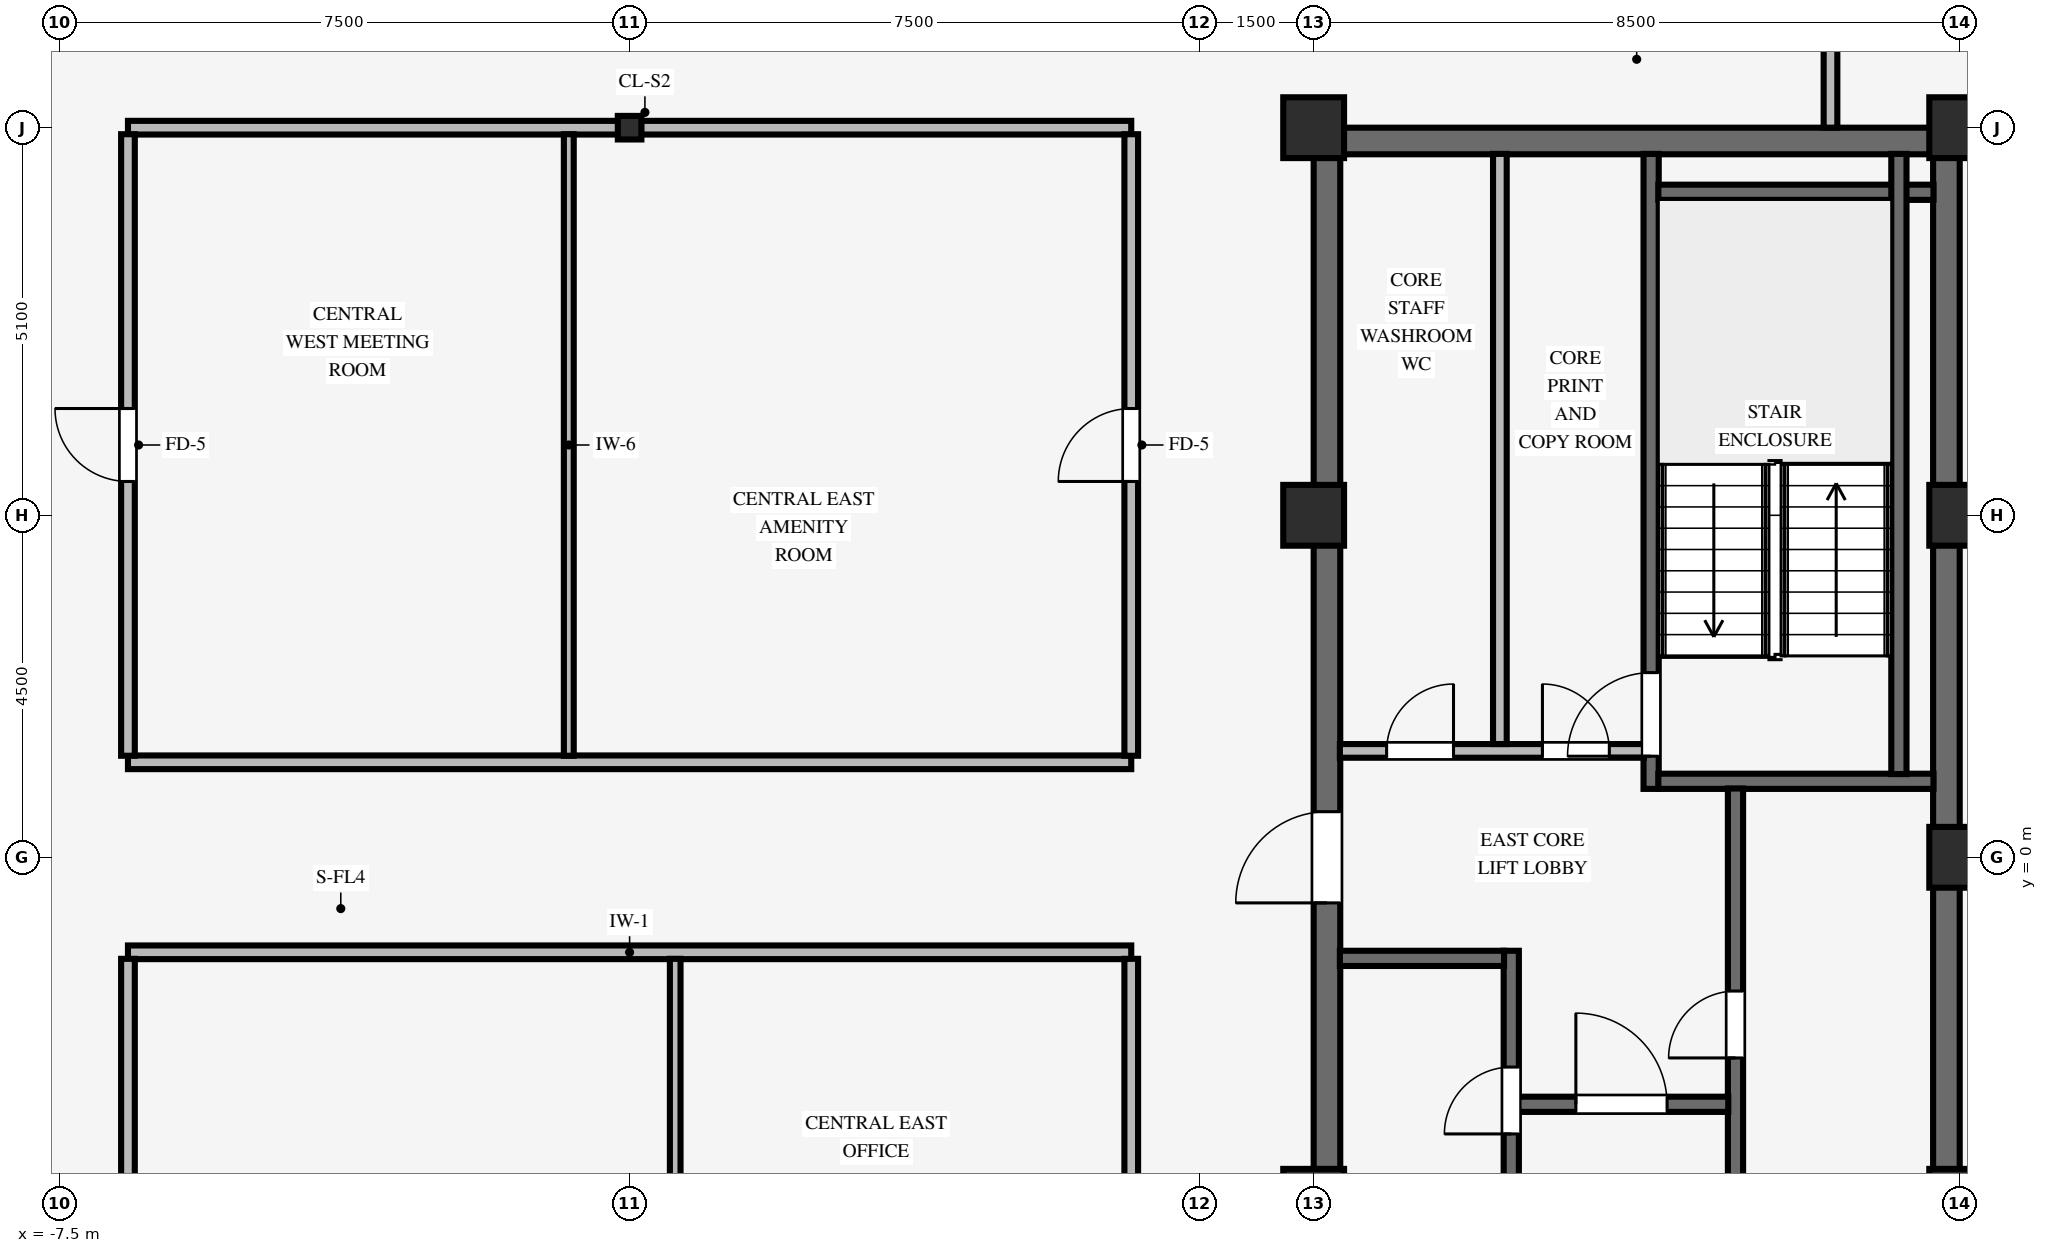
"""IFC4 building model, lengths in metres.
Left out: names, types, materials, properties, quantities, classifications, styles, units other than length and angle.
Written with IfcOpenShell. Run it as: python <this file> out.ifc"""

import sys

from ifc_helpers import new_model, si_unit, direction, frame, frame_2d, origin, origin_2d, place, context, subcontext, project, spatial, rectangle, i_section, extrude, source, transform, mapped, element, fill, save


model = new_model("IFC4")
c1 = context("Model", 3, precision=1e-05, world=origin(), true_north=direction((0.0, 1.0)))
c2 = subcontext(c1, "Body", "Model", "MODEL_VIEW")
j1 = project(units=[si_unit("LENGTHUNIT", "METRE"), si_unit("PLANEANGLEUNIT", "RADIAN")], contexts=[c1])
p1 = place(None, origin())
s1 = spatial("IfcSite", under=j1, at=p1, CompositionType="ELEMENT")
p2 = place(p1, origin())
s2 = spatial("IfcBuilding", under=s1, at=p2, CompositionType="ELEMENT")
p3 = place(p2, frame((0.0, 0.0, 231.05)))
s3 = spatial("IfcBuildingStorey", under=s2, at=p3, CompositionType="ELEMENT", Elevation=231.05)
p4 = place(p3, frame((9.0, 9.425, 0.0), z_axis=(0.0, 0.0, 1.0), x_axis=(1.0, 0.0, 0.0)))
e1 = element("IfcWall", 1, at=p4, inside=s3, PredefinedType="SHEAR", context=c2, shape_type="SweptSolid", body=[
    extrude(rectangle(XDim=8.5, YDim=0.35, at=frame_2d((4.25, 0.0))), origin(), (0.0, 0.0, 1.0), 3.37),
])
p5 = place(p3, frame((9.175, -9.255, 0.0), z_axis=(0.0, 0.0, 1.0), x_axis=(0.0, 1.0, 0.0)))
e2 = element("IfcWall", 2, at=p5, inside=s3, PredefinedType="SHEAR", context=c2, shape_type="SweptSolid", body=[
    extrude(rectangle(XDim=18.51, YDim=0.35, at=frame_2d((9.255, 0.0))), origin(), (0.0, 0.0, 1.0), 3.37),
])
p6 = place(p5, frame((8.655, 0.0, 0.0)))
e3 = element("IfcOpeningElement", 3, at=p6, cuts=e2, PredefinedType="OPENING", context=c2, shape_type="SweptSolid", body=[
    extrude(rectangle(XDim=1.2, YDim=2.15, at=frame_2d((0.6, 1.075))), frame((0.0, 0.185, 0.0), z_axis=(0.0, -1.0, 0.0), x_axis=(1.0, 0.0, 0.0)), (0.0, 0.0, 1.0), 0.37),
])
p7 = place(p3, frame((17.325, -9.255, 0.0), z_axis=(0.0, 0.0, 1.0), x_axis=(0.0, 1.0, 0.0)))
e4 = element("IfcWall", 4, at=p7, inside=s3, PredefinedType="SHEAR", context=c2, shape_type="SweptSolid", body=[
    extrude(rectangle(XDim=18.51, YDim=0.35, at=frame_2d((9.255, 0.0))), origin(), (0.0, 0.0, 1.0), 3.37),
])
for number, where, z_axis, x_axis in (
    (5, (9.0, -4.5, 0.0), (0.0, 0.0, 1.0), (1.0, 0.0, 0.0)),
    (6, (9.0, 4.5, 0.0), (0.0, 0.0, 1.0), (1.0, 0.0, 0.0)),
    (7, (9.0, 9.6, 0.0), (0.0, 0.0, 1.0), (1.0, 0.0, 0.0)),
    (8, (17.5, -4.5, 0.0), (0.0, 0.0, 1.0), (1.0, 0.0, 0.0)),
    (9, (17.5, 4.5, 0.0), (0.0, 0.0, 1.0), (1.0, 0.0, 0.0)),
    (10, (17.5, 9.6, 0.0), (0.0, 0.0, 1.0), (1.0, 0.0, 0.0)),
    (11, (17.5, 0.0, 0.0), (0.0, 0.0, 1.0), (1.0, 0.0, 0.0)),
):
    element("IfcColumn", number, at=place(p3, frame(where, z_axis=z_axis, x_axis=x_axis)), inside=s3, PredefinedType="COLUMN", context=c2, shape_type="SweptSolid", body=[
        extrude(rectangle(XDim=0.8, YDim=0.8, at=origin_2d()), origin(), (0.0, 0.0, 1.0), 3.37),
    ])
p8 = place(p3, frame((0.0, 9.6, 0.0), z_axis=(0.0, 0.0, 1.0), x_axis=(1.0, 0.0, 0.0)))
e12 = element("IfcColumn", 12, at=p8, inside=s3, PredefinedType="COLUMN", context=c2, shape_type="SweptSolid", body=[
    extrude(i_section(OverallWidth=0.31, OverallDepth=0.31, WebThickness=0.015, FlangeThickness=0.015, FilletRadius=0.015, at=origin_2d()), origin(), (0.0, 0.0, 1.0), 3.37),
])
p9 = place(p3, frame((13.44, 0.9, 0.0), z_axis=(0.0, 0.0, 1.0), x_axis=(0.0, 1.0, 0.0)))
e13 = element("IfcWall", 13, at=p9, inside=s3, PredefinedType="SHEAR", context=c2, shape_type="SweptSolid", body=[
    extrude(rectangle(XDim=8.355, YDim=0.2, at=frame_2d((4.177, 0.0))), origin(), (0.0, 0.0, 1.0), 3.37),
])
p10 = place(p9, frame((0.43, 0.0, 0.0)))
e14 = element("IfcOpeningElement", 14, at=p10, cuts=e13, PredefinedType="OPENING", context=c2, shape_type="SweptSolid", body=[
    extrude(rectangle(XDim=1.1, YDim=2.15, at=frame_2d((0.55, 1.075))), frame((0.0, 0.11, 0.0), z_axis=(0.0, -1.0, 0.0), x_axis=(1.0, 0.0, 0.0)), (0.0, 0.0, 1.0), 0.22),
])
for number, where, z_axis, x_axis in (
    (15, (13.535, 1.0, 0.0), (0.0, 0.0, 1.0), (1.0, 0.0, 0.0)),
    (16, (13.535, 8.75, 0.0), (0.0, 0.0, 1.0), (1.0, 0.0, 0.0)),
):
    element("IfcWall", number, at=place(p3, frame(where, z_axis=z_axis, x_axis=x_axis)), inside=s3, PredefinedType="SHEAR", context=c2, shape_type="SweptSolid", body=[
        extrude(rectangle(XDim=3.62, YDim=0.2, at=frame_2d((1.81, 0.0))), origin(), (0.0, 0.0, 1.0), 3.37),
    ])
p11 = place(p3, frame((16.7, 1.095, 0.0), z_axis=(0.0, 0.0, 1.0), x_axis=(0.0, 1.0, 0.0)))
e17 = element("IfcWall", 17, at=p11, inside=s3, PredefinedType="SHEAR", context=c2, shape_type="SweptSolid", body=[
    extrude(rectangle(XDim=8.16, YDim=0.2, at=frame_2d((4.08, 0.0))), origin(), (0.0, 0.0, 1.0), 3.37),
])
p12 = place(p3, frame((14.55, -9.255, 0.0), z_axis=(0.0, 0.0, 1.0), x_axis=(0.0, 1.0, 0.0)))
e18 = element("IfcWall", 18, at=p12, inside=s3, PredefinedType="SHEAR", context=c2, shape_type="SweptSolid", body=[
    extrude(rectangle(XDim=10.16, YDim=0.2, at=frame_2d((5.08, 0.0))), origin(), (0.0, 0.0, 1.0), 3.37),
])
p13 = place(p12, frame((6.615, 0.0, 0.0)))
e19 = element("IfcOpeningElement", 19, at=p13, cuts=e18, PredefinedType="OPENING", context=c2, shape_type="SweptSolid", body=[
    extrude(rectangle(XDim=0.88, YDim=2.1, at=frame_2d((0.44, 1.05))), frame((0.0, 0.11, 0.0), z_axis=(0.0, -1.0, 0.0), x_axis=(1.0, 0.0, 0.0)), (0.0, 0.0, 1.0), 0.22),
])
p14 = place(p12, frame((0.98, 0.0, 0.0)))
e20 = element("IfcOpeningElement", 20, at=p14, cuts=e18, PredefinedType="OPENING", context=c2, shape_type="SweptSolid", body=[
    extrude(rectangle(XDim=1.15, YDim=2.15, at=frame_2d((0.575, 1.075))), frame((0.0, 0.11, 0.0), z_axis=(0.0, -1.0, 0.0), x_axis=(1.0, 0.0, 0.0)), (0.0, 0.0, 1.0), 0.22),
])
p15 = place(p3, frame((11.6, -9.255, 0.0), z_axis=(0.0, 0.0, 1.0), x_axis=(0.0, 1.0, 0.0)))
e21 = element("IfcWall", 21, at=p15, inside=s3, PredefinedType="SHEAR", context=c2, shape_type="SweptSolid", body=[
    extrude(rectangle(XDim=8.025, YDim=0.2, at=frame_2d((4.012, 0.0))), origin(), (0.0, 0.0, 1.0), 3.37),
])
p16 = place(p15, frame((5.615, 0.0, 0.0)))
e22 = element("IfcOpeningElement", 22, at=p16, cuts=e21, PredefinedType="OPENING", context=c2, shape_type="SweptSolid", body=[
    extrude(rectangle(XDim=0.88, YDim=2.1, at=frame_2d((0.44, 1.05))), frame((0.0, 0.11, 0.0), z_axis=(0.0, -1.0, 0.0), x_axis=(1.0, 0.0, 0.0)), (0.0, 0.0, 1.0), 0.22),
])
p17 = place(p3, frame((11.695, -3.25, 0.0), z_axis=(0.0, 0.0, 1.0), x_axis=(1.0, 0.0, 0.0)))
e23 = element("IfcWall", 23, at=p17, inside=s3, PredefinedType="SHEAR", context=c2, shape_type="SweptSolid", body=[
    extrude(rectangle(XDim=2.76, YDim=0.2, at=frame_2d((1.38, 0.0))), origin(), (0.0, 0.0, 1.0), 3.37),
])
p18 = place(p17, frame((0.755, 0.0, 0.0)))
e24 = element("IfcOpeningElement", 24, at=p18, cuts=e23, PredefinedType="OPENING", context=c2, shape_type="SweptSolid", body=[
    extrude(rectangle(XDim=1.2, YDim=2.15, at=frame_2d((0.6, 1.075))), frame((0.0, 0.11, 0.0), z_axis=(0.0, -1.0, 0.0), x_axis=(1.0, 0.0, 0.0)), (0.0, 0.0, 1.0), 0.22),
])
p19 = place(p3, frame((9.345, -1.33, 0.0), z_axis=(0.0, 0.0, 1.0), x_axis=(1.0, 0.0, 0.0)))
e25 = element("IfcWall", 25, at=p19, inside=s3, PredefinedType="SHEAR", context=c2, shape_type="SweptSolid", body=[
    extrude(rectangle(XDim=2.16, YDim=0.2, at=frame_2d((1.08, 0.0))), origin(), (0.0, 0.0, 1.0), 3.37),
])
p20 = place(p3, frame((9.345, 1.4, 0.0), z_axis=(0.0, 0.0, 1.0), x_axis=(1.0, 0.0, 0.0)))
e26 = element("IfcWall", 26, at=p20, inside=s3, PredefinedType="PARTITIONING", context=c2, shape_type="SweptSolid", body=[
    extrude(rectangle(XDim=4.0, YDim=0.18, at=frame_2d((2.0, 0.0))), origin(), (0.0, 0.0, 1.0), 3.36),
])
p21 = place(p20, frame((0.615, 0.0, 0.0)))
e27 = element("IfcOpeningElement", 27, at=p21, cuts=e26, PredefinedType="OPENING", context=c2, shape_type="SweptSolid", body=[
    extrude(rectangle(XDim=0.88, YDim=2.1, at=frame_2d((0.44, 1.05))), frame((0.0, 0.1, 0.0), z_axis=(0.0, -1.0, 0.0), x_axis=(1.0, 0.0, 0.0)), (0.0, 0.0, 1.0), 0.2),
])
p22 = place(p20, frame((2.665, 0.0, 0.0)))
e28 = element("IfcOpeningElement", 28, at=p22, cuts=e26, PredefinedType="OPENING", context=c2, shape_type="SweptSolid", body=[
    extrude(rectangle(XDim=0.88, YDim=2.1, at=frame_2d((0.44, 1.05))), frame((0.0, 0.1, 0.0), z_axis=(0.0, -1.0, 0.0), x_axis=(1.0, 0.0, 0.0)), (0.0, 0.0, 1.0), 0.2),
])
p23 = place(p3, frame((11.45, 1.49, 0.0), z_axis=(0.0, 0.0, 1.0), x_axis=(0.0, 1.0, 0.0)))
e29 = element("IfcWall", 29, at=p23, inside=s3, PredefinedType="PARTITIONING", context=c2, shape_type="SweptSolid", body=[
    extrude(rectangle(XDim=7.765, YDim=0.18, at=frame_2d((3.882, 0.0))), origin(), (0.0, 0.0, 1.0), 3.36),
])
for number, where, z_axis, x_axis in (
    (30, (-6.6, -1.25, 0.0), (0.0, 0.0, 1.0), (1.0, 0.0, 0.0)),
    (31, (-6.6, 1.25, 0.0), (0.0, 0.0, 1.0), (1.0, 0.0, 0.0)),
):
    element("IfcWall", number, at=place(p3, frame(where, z_axis=z_axis, x_axis=x_axis)), inside=s3, PredefinedType="PARTITIONING", context=c2, shape_type="SweptSolid", body=[
        extrude(rectangle(XDim=13.2, YDim=0.18, at=frame_2d((6.6, 0.0))), origin(), (0.0, 0.0, 1.0), 3.36),
    ])
for number, where, z_axis, x_axis in (
    (32, (-6.6, 9.6, 0.0), (0.0, 0.0, 1.0), (1.0, 0.0, 0.0)),
    (33, (0.151, 9.6, 0.0), (0.0, 0.0, 1.0), (1.0, 0.0, 0.0)),
):
    element("IfcWall", number, at=place(p3, frame(where, z_axis=z_axis, x_axis=x_axis)), inside=s3, PredefinedType="PARTITIONING", context=c2, shape_type="SweptSolid", body=[
        extrude(rectangle(XDim=6.449, YDim=0.18, at=frame_2d((3.225, 0.0))), origin(), (0.0, 0.0, 1.0), 2.405),
    ])
p24 = place(p3, frame((-6.6, -19.1, 0.0), z_axis=(0.0, 0.0, 1.0), x_axis=(0.0, 1.0, 0.0)))
e34 = element("IfcWall", 34, at=p24, inside=s3, PredefinedType="PARTITIONING", context=c2, shape_type="SweptSolid", body=[
    extrude(rectangle(XDim=17.764, YDim=0.18, at=frame_2d((8.882, 0.0))), origin(), (0.0, 0.0, 1.0), 3.36),
])
p25 = place(p24, frame((13.152, 0.0, 0.0)))
e35 = element("IfcOpeningElement", 35, at=p25, cuts=e34, PredefinedType="OPENING", context=c2, shape_type="SweptSolid", body=[
    extrude(rectangle(XDim=0.96, YDim=2.1, at=frame_2d((0.48, 1.05))), frame((0.0, 0.1, 0.0), z_axis=(0.0, -1.0, 0.0), x_axis=(1.0, 0.0, 0.0)), (0.0, 0.0, 1.0), 0.2),
])
p26 = place(p24, frame((1.37, 0.0, 0.0)))
e36 = element("IfcOpeningElement", 36, at=p26, cuts=e34, PredefinedType="OPENING", context=c2, shape_type="SweptSolid", body=[
    extrude(rectangle(XDim=0.96, YDim=2.1, at=frame_2d((0.48, 1.05))), frame((0.0, 0.1, 0.0), z_axis=(0.0, -1.0, 0.0), x_axis=(1.0, 0.0, 0.0)), (0.0, 0.0, 1.0), 0.2),
])
p27 = place(p3, frame((-6.6, 1.336, 0.0), z_axis=(0.0, 0.0, 1.0), x_axis=(0.0, 1.0, 0.0)))
e37 = element("IfcWall", 37, at=p27, inside=s3, PredefinedType="PARTITIONING", context=c2, shape_type="SweptSolid", body=[
    extrude(rectangle(XDim=8.178, YDim=0.18, at=frame_2d((4.089, 0.0))), origin(), (0.0, 0.0, 1.0), 3.36),
])
p28 = place(p27, frame((3.609, 0.0, 0.0)))
e38 = element("IfcOpeningElement", 38, at=p28, cuts=e37, PredefinedType="OPENING", context=c2, shape_type="SweptSolid", body=[
    extrude(rectangle(XDim=0.96, YDim=2.1, at=frame_2d((0.48, 1.05))), frame((0.0, 0.1, 0.0), z_axis=(0.0, -1.0, 0.0), x_axis=(1.0, 0.0, 0.0)), (0.0, 0.0, 1.0), 0.2),
])
p29 = place(p3, frame((-0.8, 1.336, 0.0), z_axis=(0.0, 0.0, 1.0), x_axis=(0.0, 1.0, 0.0)))
e39 = element("IfcWall", 39, at=p29, inside=s3, PredefinedType="PARTITIONING", context=c2, shape_type="SweptSolid", body=[
    extrude(rectangle(XDim=8.178, YDim=0.13, at=frame_2d((4.089, 0.0))), origin(), (0.0, 0.0, 1.0), 3.36),
])
p30 = place(p3, frame((0.6, -9.524, 0.0), z_axis=(0.0, 0.0, 1.0), x_axis=(0.0, 1.0, 0.0)))
e40 = element("IfcWall", 40, at=p30, inside=s3, PredefinedType="PARTITIONING", context=c2, shape_type="SweptSolid", body=[
    extrude(rectangle(XDim=8.188, YDim=0.14, at=frame_2d((4.094, 0.0))), origin(), (0.0, 0.0, 1.0), 3.36),
])
p31 = place(p3, frame((6.6, -19.1, 0.0), z_axis=(0.0, 0.0, 1.0), x_axis=(0.0, 1.0, 0.0)))
e41 = element("IfcWall", 41, at=p31, inside=s3, PredefinedType="PARTITIONING", context=c2, shape_type="SweptSolid", body=[
    extrude(rectangle(XDim=17.764, YDim=0.18, at=frame_2d((8.882, 0.0))), origin(), (0.0, 0.0, 1.0), 3.36),
])
p32 = place(p31, frame((13.152, 0.0, 0.0)))
e42 = element("IfcOpeningElement", 42, at=p32, cuts=e41, PredefinedType="OPENING", context=c2, shape_type="SweptSolid", body=[
    extrude(rectangle(XDim=0.96, YDim=2.1, at=frame_2d((0.48, 1.05))), frame((0.0, 0.1, 0.0), z_axis=(0.0, -1.0, 0.0), x_axis=(1.0, 0.0, 0.0)), (0.0, 0.0, 1.0), 0.2),
])
p33 = place(p31, frame((6.72, 0.0, 0.0)))
e43 = element("IfcOpeningElement", 43, at=p33, cuts=e41, PredefinedType="OPENING", context=c2, shape_type="SweptSolid", body=[
    extrude(rectangle(XDim=0.96, YDim=2.1, at=frame_2d((0.48, 1.05))), frame((0.0, 0.1, 0.0), z_axis=(0.0, -1.0, 0.0), x_axis=(1.0, 0.0, 0.0)), (0.0, 0.0, 1.0), 0.2),
])
p34 = place(p3, frame((6.6, 1.336, 0.0), z_axis=(0.0, 0.0, 1.0), x_axis=(0.0, 1.0, 0.0)))
e44 = element("IfcWall", 44, at=p34, inside=s3, PredefinedType="PARTITIONING", context=c2, shape_type="SweptSolid", body=[
    extrude(rectangle(XDim=8.178, YDim=0.18, at=frame_2d((4.089, 0.0))), origin(), (0.0, 0.0, 1.0), 3.36),
])
p35 = place(p34, frame((3.609, 0.0, 0.0)))
e45 = element("IfcOpeningElement", 45, at=p35, cuts=e44, PredefinedType="OPENING", context=c2, shape_type="SweptSolid", body=[
    extrude(rectangle(XDim=0.96, YDim=2.1, at=frame_2d((0.48, 1.05))), frame((0.0, 0.1, 0.0), z_axis=(0.0, -1.0, 0.0), x_axis=(1.0, 0.0, 0.0)), (0.0, 0.0, 1.0), 0.2),
])
p36 = place(p3, frame((15.8, 9.6, 0.0), z_axis=(0.0, 0.0, 1.0), x_axis=(0.0, 1.0, 0.0)))
e46 = element("IfcWall", 46, at=p36, inside=s3, PredefinedType="PARTITIONING", context=c2, shape_type="SweptSolid", body=[
    extrude(rectangle(XDim=2.514, YDim=0.18, at=frame_2d((1.257, 0.0))), origin(), (0.0, 0.0, 1.0), 3.36),
])
m1 = source(origin(), c2, "Body", "SweptSolid", [
    extrude(rectangle(XDim=1.1, YDim=2.15, at=frame_2d((0.55, 1.075))), frame((0.0, 0.025, 0.0), z_axis=(0.0, -1.0, 0.0), x_axis=(1.0, 0.0, 0.0)), (0.0, 0.0, 1.0), 0.05),
])
p37 = place(p10, origin())
e47 = element("IfcDoor", 47, at=p37, inside=s3, OperationType="SINGLE_SWING_LEFT", PredefinedType="DOOR", context=c2, shape_type="MappedRepresentation", body=[
    mapped(m1, transform((0.0, 0.0, 0.0), scale=1.0)),
])
fill(e14, e47)
m2 = source(origin(), c2, "Body", "SweptSolid", [
    extrude(rectangle(XDim=0.88, YDim=2.1, at=frame_2d((0.44, 1.05))), frame((0.0, 0.025, 0.0), z_axis=(0.0, -1.0, 0.0), x_axis=(1.0, 0.0, 0.0)), (0.0, 0.0, 1.0), 0.05),
])
p38 = place(p13, origin())
e48 = element("IfcDoor", 48, at=p38, inside=s3, OperationType="SINGLE_SWING_LEFT", PredefinedType="DOOR", context=c2, shape_type="MappedRepresentation", body=[
    mapped(m2, transform((0.0, 0.0, 0.0), scale=1.0)),
])
fill(e19, e48)
m3 = source(origin(), c2, "Body", "SweptSolid", [
    extrude(rectangle(XDim=1.2, YDim=2.15, at=frame_2d((0.6, 1.075))), frame((0.0, 0.025, 0.0), z_axis=(0.0, -1.0, 0.0), x_axis=(1.0, 0.0, 0.0)), (0.0, 0.0, 1.0), 0.05),
])
p39 = place(p18, origin())
e49 = element("IfcDoor", 49, at=p39, inside=s3, OperationType="SINGLE_SWING_LEFT", PredefinedType="DOOR", context=c2, shape_type="MappedRepresentation", body=[
    mapped(m3, transform((0.0, 0.0, 0.0), scale=1.0)),
])
fill(e24, e49)
p40 = place(p16, origin())
e50 = element("IfcDoor", 50, at=p40, inside=s3, OperationType="SINGLE_SWING_LEFT", PredefinedType="DOOR", context=c2, shape_type="MappedRepresentation", body=[
    mapped(m2, transform((0.0, 0.0, 0.0), scale=1.0)),
])
fill(e22, e50)
p41 = place(p6, origin())
e51 = element("IfcDoor", 51, at=p41, inside=s3, OperationType="SINGLE_SWING_LEFT", PredefinedType="DOOR", context=c2, shape_type="MappedRepresentation", body=[
    mapped(m3, transform((0.0, 0.0, 0.0), scale=1.0)),
])
fill(e3, e51)
p42 = place(p21, origin())
e52 = element("IfcDoor", 52, at=p42, inside=s3, OperationType="SINGLE_SWING_RIGHT", PredefinedType="DOOR", context=c2, shape_type="MappedRepresentation", body=[
    mapped(m2, transform((0.0, 0.0, 0.0), scale=1.0)),
])
fill(e27, e52)
p43 = place(p22, origin())
e53 = element("IfcDoor", 53, at=p43, inside=s3, OperationType="SINGLE_SWING_LEFT", PredefinedType="DOOR", context=c2, shape_type="MappedRepresentation", body=[
    mapped(m2, transform((0.0, 0.0, 0.0), scale=1.0)),
])
fill(e28, e53)
m4 = source(origin(), c2, "Body", "SweptSolid", [
    extrude(rectangle(XDim=0.96, YDim=2.1, at=frame_2d((0.48, 1.05))), frame((0.0, 0.025, 0.0), z_axis=(0.0, -1.0, 0.0), x_axis=(1.0, 0.0, 0.0)), (0.0, 0.0, 1.0), 0.05),
])
p44 = place(p28, origin())
e54 = element("IfcDoor", 54, at=p44, inside=s3, OperationType="SINGLE_SWING_RIGHT", PredefinedType="DOOR", context=c2, shape_type="MappedRepresentation", body=[
    mapped(m4, transform((0.0, 0.0, 0.0), scale=1.0)),
])
fill(e38, e54)
p45 = place(p35, origin())
e55 = element("IfcDoor", 55, at=p45, inside=s3, OperationType="SINGLE_SWING_LEFT", PredefinedType="DOOR", context=c2, shape_type="MappedRepresentation", body=[
    mapped(m4, transform((0.0, 0.0, 0.0), scale=1.0)),
])
fill(e45, e55)
save(model, sys.argv[1])
